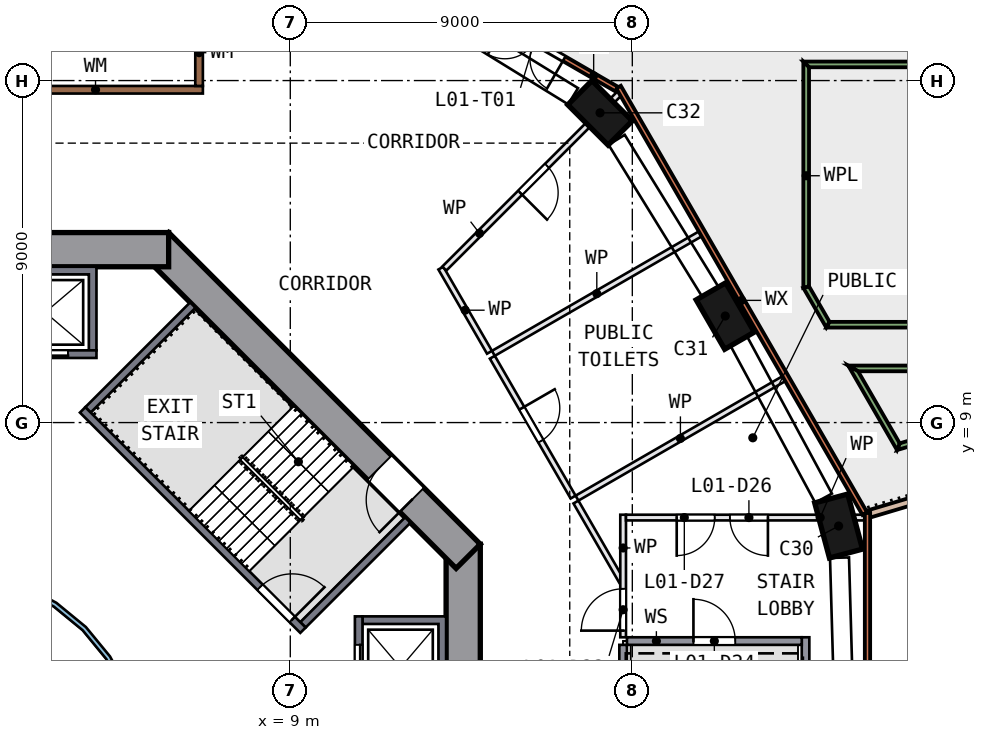
"""IFC4 building model, lengths in metres.
Left out: names, types, materials, properties, quantities, classifications, styles, units other than length and angle.
Written with IfcOpenShell. Run it as: python <this file> out.ifc"""

import sys

from ifc_helpers import new_model, si_unit, direction, frame, frame_2d, origin, origin_2d, place, context, subcontext, project, spatial, polyline, rectangle, outline, extrude, element, fill, save


model = new_model("IFC4")
c1 = context("Model", 3, precision=1e-05, world=origin(), true_north=direction((0.0, 1.0)))
c2 = subcontext(c1, "Body", "Model", "MODEL_VIEW")
j1 = project(units=[si_unit("LENGTHUNIT", "METRE"), si_unit("PLANEANGLEUNIT", "RADIAN")], contexts=[c1])
p1 = place(None, origin())
s1 = spatial("IfcSite", under=j1, at=p1, CompositionType="ELEMENT")
p2 = place(p1, origin())
s2 = spatial("IfcBuilding", under=s1, at=p2, CompositionType="ELEMENT")
p3 = place(p2, frame((0.0, 0.0, 8.0)))
s3 = spatial("IfcBuildingStorey", under=s2, at=p3, CompositionType="ELEMENT", Elevation=8.0)
for number, where, z_axis, x_axis in (
    (1, (23.428, 6.278, 0.0), (0.0, 0.0, 1.0), (0.259, -0.966, 0.0)),
    (2, (20.445, 11.804, 0.0), (0.0, 0.0, 1.0), (-0.5, 0.866, 0.0)),
    (3, (17.151, 17.151, 0.0), (0.0, 0.0, 1.0), (0.707, -0.707, 0.0)),
):
    element("IfcColumn", number, at=place(p3, frame(where, z_axis=z_axis, x_axis=x_axis)), inside=s3, PredefinedType="COLUMN", context=c2, shape_type="SweptSolid", body=[
        extrude(rectangle(XDim=1.5, YDim=0.9, at=origin_2d()), origin(), (0.0, 0.0, 1.0), 5.55),
    ])
p4 = place(p3, frame((13.55, -5.799, 0.0), z_axis=(0.0, 0.0, 1.0), x_axis=(0.0, 1.0, 0.0)))
e4 = element("IfcWall", 4, at=p4, inside=s3, PredefinedType="SHEAR", context=c2, shape_type="SweptSolid", body=[
    extrude(rectangle(XDim=11.598, YDim=0.9, at=frame_2d((5.799, 0.0))), origin(), (0.0, 0.0, 1.0), 6.0),
])
p5 = place(p4, frame((4.899, 0.0, 0.0)))
e5 = element("IfcOpeningElement", 5, at=p5, cuts=e4, PredefinedType="OPENING", context=c2, shape_type="SweptSolid", body=[
    extrude(rectangle(XDim=1.8, YDim=2.1, at=frame_2d((0.9, 1.05))), frame((0.0, 0.46, 0.0), z_axis=(0.0, -1.0, 0.0), x_axis=(1.0, 0.0, 0.0)), (0.0, 0.0, 1.0), 0.92),
])
p6 = place(p3, frame((13.682, 5.481, 0.0), z_axis=(0.0, 0.0, 1.0), x_axis=(-0.707106781, 0.707106781, 0.0)))
e6 = element("IfcWall", 6, at=p6, inside=s3, PredefinedType="SHEAR", context=c2, shape_type="SweptSolid", body=[
    extrude(rectangle(XDim=11.598, YDim=0.9, at=frame_2d((5.799, 0.0))), origin(), (0.0, 0.0, 1.0), 6.0),
])
p7 = place(p6, frame((2.099, 0.0, 0.0)))
e7 = element("IfcOpeningElement", 7, at=p7, cuts=e6, PredefinedType="OPENING", context=c2, shape_type="SweptSolid", body=[
    extrude(rectangle(XDim=1.2, YDim=2.1, at=frame_2d((0.6, 1.05))), frame((0.0, 0.46, 0.0), z_axis=(0.0, -1.0, 0.0), x_axis=(1.0, 0.0, 0.0)), (0.0, 0.0, 1.0), 0.92),
])
p8 = place(p3, frame((5.799, 13.55, 0.0), z_axis=(0.0, 0.0, 1.0), x_axis=(-1.0, 0.0, 0.0)))
e8 = element("IfcWall", 8, at=p8, inside=s3, PredefinedType="SHEAR", context=c2, shape_type="SweptSolid", body=[
    extrude(rectangle(XDim=11.598, YDim=0.9, at=frame_2d((5.799, 0.0))), origin(), (0.0, 0.0, 1.0), 6.0),
])
p9 = place(p8, frame((4.899, 0.0, 0.0)))
e9 = element("IfcOpeningElement", 9, at=p9, cuts=e8, PredefinedType="OPENING", context=c2, shape_type="SweptSolid", body=[
    extrude(rectangle(XDim=1.8, YDim=2.1, at=frame_2d((0.9, 1.05))), frame((0.0, 0.46, 0.0), z_axis=(0.0, -1.0, 0.0), x_axis=(1.0, 0.0, 0.0)), (0.0, 0.0, 1.0), 0.92),
])
p10 = place(p3, frame((24.188, -6.621, 0.0), z_axis=(0.0, 0.0, 1.0), x_axis=(0.0, 1.0, 0.0)))
e10 = element("IfcWall", 10, at=p10, inside=s3, PredefinedType="SOLIDWALL", context=c2, shape_type="SweptSolid", body=[
    extrude(rectangle(XDim=13.242, YDim=0.14, at=frame_2d((6.621, 0.0))), origin(), (0.0, 0.0, 1.0), 5.55),
])
p11 = place(p3, frame((24.118, 6.603, 0.0), z_axis=(0.0, 0.0, 1.0), x_axis=(-0.499997984, 0.866026568, 0.0)))
e11 = element("IfcWall", 11, at=p11, inside=s3, PredefinedType="SOLIDWALL", context=c2, shape_type="SweptSolid", body=[
    extrude(rectangle(XDim=12.962, YDim=0.14, at=frame_2d((6.481, 0.0))), origin(), (0.0, 0.0, 1.0), 5.55),
])
p12 = place(p3, frame((17.586, 17.777, 0.0), z_axis=(0.0, 0.0, 1.0), x_axis=(-0.866020975, 0.500007671, 0.0)))
e12 = element("IfcWall", 12, at=p12, inside=s3, PredefinedType="SOLIDWALL", context=c2, shape_type="SweptSolid", body=[
    extrude(rectangle(XDim=4.446, YDim=0.14, at=frame_2d((2.223, 0.0))), origin(), (0.0, 0.0, 1.0), 5.55),
])
p13 = place(p12, frame((1.593, 0.0, 0.0)))
e13 = element("IfcOpeningElement", 13, at=p13, cuts=e12, PredefinedType="OPENING", context=c2, shape_type="SweptSolid", body=[
    extrude(rectangle(XDim=1.8, YDim=2.4, at=frame_2d((0.9, 1.2))), frame((0.0, 0.08, 0.0), z_axis=(0.0, -1.0, 0.0), x_axis=(1.0, 0.0, 0.0)), (0.0, 0.0, 1.0), 0.16),
])
p14 = place(p3, origin())
e14 = element("IfcWall", 14, at=p14, inside=s3, PredefinedType="SOLIDWALL", context=c2, shape_type="SweptSolid", body=[
    extrude(outline(polyline([(24.201, 6.692), (24.258, 6.5), (36.0, 10.0), (35.8, 10.149), (24.201, 6.692)])), origin(), (0.0, 0.0, 1.0), 0.45),
])
p15 = place(p3, origin())
e15 = element("IfcWall", 15, at=p15, inside=s3, PredefinedType="SOLIDWALL", context=c2, shape_type="SweptSolid", body=[
    extrude(outline(polyline([(24.965, 8.276), (32.427, 10.5), (31.398, 10.35), (25.036, 8.454), (24.965, 8.276)])), origin(), (0.0, 0.0, 1.0), 0.6),
])
p16 = place(p3, origin())
e16 = element("IfcWall", 16, at=p16, inside=s3, PredefinedType="SOLIDWALL", context=c2, shape_type="SweptSolid", body=[
    extrude(outline(polyline([(32.427, 10.5), (23.681, 10.5), (23.941, 10.35), (31.398, 10.35), (32.427, 10.5)])), origin(), (0.0, 0.0, 1.0), 0.6),
])
p17 = place(p3, origin())
e17 = element("IfcWall", 17, at=p17, inside=s3, PredefinedType="SOLIDWALL", context=c2, shape_type="SweptSolid", body=[
    extrude(outline(polyline([(23.681, 10.5), (24.965, 8.276), (25.036, 8.454), (23.941, 10.35), (23.681, 10.5)])), origin(), (0.0, 0.0, 1.0), 0.6),
])
p18 = place(p3, origin())
e18 = element("IfcWall", 18, at=p18, inside=s3, PredefinedType="SOLIDWALL", context=c2, shape_type="SweptSolid", body=[
    extrude(outline(polyline([(22.5, 12.545), (23.104, 11.5), (23.19, 11.65), (22.65, 12.586), (22.5, 12.545)])), origin(), (0.0, 0.0, 1.0), 0.6),
])
p19 = place(p3, origin())
e19 = element("IfcWall", 19, at=p19, inside=s3, PredefinedType="SOLIDWALL", context=c2, shape_type="SweptSolid", body=[
    extrude(outline(polyline([(23.104, 11.5), (32.5, 11.5), (32.35, 11.65), (23.19, 11.65), (23.104, 11.5)])), origin(), (0.0, 0.0, 1.0), 0.6),
])
p20 = place(p3, origin())
e20 = element("IfcWall", 20, at=p20, inside=s3, PredefinedType="SOLIDWALL", context=c2, shape_type="SweptSolid", body=[
    extrude(outline(polyline([(28.5, 18.5), (22.5, 18.5), (22.65, 18.35), (28.65, 18.35), (28.5, 18.5)])), origin(), (0.0, 0.0, 1.0), 0.6),
])
p21 = place(p3, origin())
e21 = element("IfcWall", 21, at=p21, inside=s3, PredefinedType="SOLIDWALL", context=c2, shape_type="SweptSolid", body=[
    extrude(outline(polyline([(22.5, 18.5), (22.5, 12.545), (22.65, 12.586), (22.65, 18.35), (22.5, 18.5)])), origin(), (0.0, 0.0, 1.0), 0.6),
])
p22 = place(p3, origin())
e22 = element("IfcWall", 22, at=p22, inside=s3, PredefinedType="SOLIDWALL", context=c2, shape_type="SweptSolid", body=[
    extrude(outline(polyline([(13.1, 3.9), (13.1, 1.2), (10.9, 1.2), (10.9, 1.4), (12.9, 1.4), (12.9, 3.7), (10.9, 3.7), (10.9, 3.9), (13.1, 3.9)])), origin(), (0.0, 0.0, 1.0), 5.55),
])
p23 = place(p3, frame((10.8, 1.2, 0.0), z_axis=(0.0, 0.0, 1.0), x_axis=(0.0, 1.0, 0.0)))
e23 = element("IfcWall", 23, at=p23, inside=s3, PredefinedType="SOLIDWALL", context=c2, shape_type="SweptSolid", body=[
    extrude(rectangle(XDim=2.7, YDim=0.2, at=frame_2d((1.35, 0.0))), origin(), (0.0, 0.0, 1.0), 5.55),
])
p24 = place(p23, frame((0.75, 0.0, 0.0)))
e24 = element("IfcOpeningElement", 24, at=p24, cuts=e23, PredefinedType="OPENING", context=c2, shape_type="SweptSolid", body=[
    extrude(rectangle(XDim=1.2, YDim=2.1, at=frame_2d((0.6, 1.05))), frame((0.0, 0.11, 0.0), z_axis=(0.0, -1.0, 0.0), x_axis=(1.0, 0.0, 0.0)), (0.0, 0.0, 1.0), 0.22),
])
p25 = place(p3, origin())
e25 = element("IfcWall", 25, at=p25, inside=s3, PredefinedType="SOLIDWALL", context=c2, shape_type="SweptSolid", body=[
    extrude(outline(polyline([(3.9, 13.1), (3.9, 10.9), (3.7, 10.9), (3.7, 12.9), (1.4, 12.9), (1.4, 10.9), (1.2, 10.9), (1.2, 13.1), (3.9, 13.1)])), origin(), (0.0, 0.0, 1.0), 5.55),
])
p26 = place(p3, frame((1.2, 10.8, 0.0), z_axis=(0.0, 0.0, 1.0), x_axis=(1.0, 0.0, 0.0)))
e26 = element("IfcWall", 26, at=p26, inside=s3, PredefinedType="SOLIDWALL", context=c2, shape_type="SweptSolid", body=[
    extrude(rectangle(XDim=2.7, YDim=0.2, at=frame_2d((1.35, 0.0))), origin(), (0.0, 0.0, 1.0), 5.55),
])
p27 = place(p26, frame((0.75, 0.0, 0.0)))
e27 = element("IfcOpeningElement", 27, at=p27, cuts=e26, PredefinedType="OPENING", context=c2, shape_type="SweptSolid", body=[
    extrude(rectangle(XDim=1.2, YDim=2.1, at=frame_2d((0.6, 1.05))), frame((0.0, 0.11, 0.0), z_axis=(0.0, -1.0, 0.0), x_axis=(1.0, 0.0, 0.0)), (0.0, 0.0, 1.0), 0.22),
])
p28 = place(p3, frame((3.535, 9.334, 0.0), z_axis=(0.0, 0.0, 1.0), x_axis=(0.707106781, -0.707106781, 0.0)))
e28 = element("IfcWall", 28, at=p28, inside=s3, PredefinedType="SOLIDWALL", context=c2, shape_type="SweptSolid", body=[
    extrude(rectangle(XDim=8.2, YDim=0.2, at=frame_2d((4.1, 0.0))), origin(), (0.0, 0.0, 1.0), 5.55),
])
p29 = place(p28, frame((6.6, 0.0, 0.0)))
e29 = element("IfcOpeningElement", 29, at=p29, cuts=e28, PredefinedType="OPENING", context=c2, shape_type="SweptSolid", body=[
    extrude(rectangle(XDim=1.2, YDim=2.1, at=frame_2d((0.6, 1.05))), frame((0.0, 0.11, 0.0), z_axis=(0.0, -1.0, 0.0), x_axis=(1.0, 0.0, 0.0)), (0.0, 0.0, 1.0), 0.22),
])
for number, where, z_axis, x_axis in (
    (30, (9.334, 3.677, 0.0), (0.0, 0.0, 1.0), (0.707, 0.707, 0.0)),
    (31, (3.677, 9.334, 0.0), (0.0, 0.0, 1.0), (0.707, 0.707, 0.0)),
):
    element("IfcWall", number, at=place(p3, frame(where, z_axis=z_axis, x_axis=x_axis)), inside=s3, PredefinedType="SOLIDWALL", context=c2, shape_type="SweptSolid", body=[
        extrude(rectangle(XDim=3.9, YDim=0.2, at=frame_2d((1.95, 0.0))), origin(), (0.0, 0.0, 1.0), 5.55),
    ])
p30 = place(p3, origin())
e32 = element("IfcWall", 32, at=p30, inside=s3, PredefinedType="SOLIDWALL", context=c2, shape_type="SweptSolid", body=[
    extrude(outline(polyline([(5.021, -0.999), (4.73, -1.959), (4.257, -2.844), (3.62, -3.62), (2.844, -4.257), (1.959, -4.73), (0.999, -5.021), (0.0, -5.12), (-0.999, -5.021), (-1.959, -4.73), (-2.844, -4.257), (-3.62, -3.62), (-4.257, -2.844), (-4.73, -1.959), (-5.021, -0.999), (-5.12, 0.0), (-5.021, 0.999), (-4.73, 1.959), (-4.257, 2.844), (-3.62, 3.62), (-2.844, 4.257), (-1.959, 4.73), (-0.999, 5.021), (0.0, 5.12), (0.999, 5.021), (1.959, 4.73), (2.844, 4.257), (3.62, 3.62), (4.257, 2.844), (4.73, 1.959), (5.021, 0.999), (5.12, 0.0), (5.021, -0.999)]), holes=[polyline([(4.904, 0.976), (4.619, 1.913), (4.157, 2.778), (3.535, 3.535), (2.778, 4.157), (1.913, 4.619), (0.976, 4.904), (0.0, 5.0), (-0.976, 4.904), (-1.913, 4.619), (-2.778, 4.157), (-3.535, 3.535), (-4.157, 2.778), (-4.619, 1.913), (-4.904, 0.976), (-5.0, 0.0), (-4.904, -0.976), (-4.619, -1.913), (-4.157, -2.778), (-3.535, -3.535), (-2.778, -4.157), (-1.913, -4.619), (-0.976, -4.904), (0.0, -5.0), (0.976, -4.904), (1.913, -4.619), (2.778, -4.157), (3.535, -3.535), (4.157, -2.778), (4.619, -1.913), (4.904, -0.976), (5.0, 0.0), (4.904, 0.976)])]), origin(), (0.0, 0.0, 1.0), 5.55),
])
p31 = place(p3, frame((6.7, 17.758, 0.0), z_axis=(0.0, 0.0, 1.0), x_axis=(-1.0, 0.0, 0.0)))
e33 = element("IfcWall", 33, at=p31, inside=s3, PredefinedType="SOLIDWALL", context=c2, shape_type="SweptSolid", body=[
    extrude(rectangle(XDim=13.2, YDim=0.2, at=frame_2d((6.6, 0.0))), origin(), (0.0, 0.0, 1.0), 5.55),
])
p32 = place(p31, frame((5.85, 0.0, 0.0)))
e34 = element("IfcOpeningElement", 34, at=p32, cuts=e33, PredefinedType="OPENING", context=c2, shape_type="SweptSolid", body=[
    extrude(rectangle(XDim=1.8, YDim=2.1, at=frame_2d((0.9, 1.05))), frame((0.0, 0.11, 0.0), z_axis=(0.0, -1.0, 0.0), x_axis=(1.0, 0.0, 0.0)), (0.0, 0.0, 1.0), 0.22),
])
p33 = place(p3, frame((6.6, 23.415, 0.0), z_axis=(0.0, 0.0, 1.0), x_axis=(0.0, -1.0, 0.0)))
e35 = element("IfcWall", 35, at=p33, inside=s3, PredefinedType="SOLIDWALL", context=c2, shape_type="SweptSolid", body=[
    extrude(rectangle(XDim=5.557, YDim=0.2, at=frame_2d((2.778, 0.0))), origin(), (0.0, 0.0, 1.0), 5.55),
])
p34 = place(p33, frame((1.807, 0.0, 0.0)))
e36 = element("IfcOpeningElement", 36, at=p34, cuts=e35, PredefinedType="OPENING", context=c2, shape_type="SweptSolid", body=[
    extrude(rectangle(XDim=1.8, YDim=2.1, at=frame_2d((0.9, 1.05))), frame((0.0, 0.11, 0.0), z_axis=(0.0, -1.0, 0.0), x_axis=(1.0, 0.0, 0.0)), (0.0, 0.0, 1.0), 0.22),
])
p35 = place(p3, frame((12.962, 13.065, 0.0), z_axis=(0.0, 0.0, 1.0), x_axis=(0.499997778, -0.866026686, 0.0)))
e37 = element("IfcWall", 37, at=p35, inside=s3, PredefinedType="PARTITIONING", context=c2, shape_type="SweptSolid", body=[
    extrude(rectangle(XDim=2.559, YDim=0.15, at=frame_2d((1.279, 0.0))), origin(), (0.0, 0.0, 1.0), 5.55),
])
p36 = place(p3, frame((14.317, 10.719, 0.0), z_axis=(0.0, 0.0, 1.0), x_axis=(0.500037366, -0.866003829, 0.0)))
e38 = element("IfcWall", 38, at=p36, inside=s3, PredefinedType="PARTITIONING", context=c2, shape_type="SweptSolid", body=[
    extrude(rectangle(XDim=4.25, YDim=0.15, at=frame_2d((2.125, 0.0))), origin(), (0.0, 0.0, 1.0), 5.55),
])
p37 = place(p36, frame((1.55, 0.0, 0.0)))
e39 = element("IfcOpeningElement", 39, at=p37, cuts=e38, PredefinedType="OPENING", context=c2, shape_type="SweptSolid", body=[
    extrude(rectangle(XDim=1.0, YDim=2.1, at=frame_2d((0.5, 1.05))), frame((0.0, 0.085, 0.0), z_axis=(0.0, -1.0, 0.0), x_axis=(1.0, 0.0, 0.0)), (0.0, 0.0, 1.0), 0.17),
])
p38 = place(p3, frame((16.517, 6.909, 0.0), z_axis=(0.0, 0.0, 1.0), x_axis=(0.499933044, -0.866064057, 0.0)))
e40 = element("IfcWall", 40, at=p38, inside=s3, PredefinedType="PARTITIONING", context=c2, shape_type="SweptSolid", body=[
    extrude(rectangle(XDim=2.408, YDim=0.15, at=frame_2d((1.204, 0.0))), origin(), (0.0, 0.0, 1.0), 5.55),
])
p39 = place(p3, frame((17.758, 3.15, 0.0), z_axis=(0.0, 0.0, 1.0), x_axis=(0.0, -1.0, 0.0)))
e41 = element("IfcWall", 41, at=p39, inside=s3, PredefinedType="SOLIDWALL", context=c2, shape_type="SweptSolid", body=[
    extrude(rectangle(XDim=9.3, YDim=0.2, at=frame_2d((4.65, 0.0))), origin(), (0.0, 0.0, 1.0), 5.55),
])
p40 = place(p3, frame((17.758, 3.35, 0.0), z_axis=(0.0, 0.0, 1.0), x_axis=(0.0, 1.0, 0.0)))
e42 = element("IfcWall", 42, at=p40, inside=s3, PredefinedType="PARTITIONING", context=c2, shape_type="SweptSolid", body=[
    extrude(rectangle(XDim=3.225, YDim=0.15, at=frame_2d((1.613, 0.0))), origin(), (0.0, 0.0, 1.0), 5.55),
])
p41 = place(p40, frame((0.175, 0.0, 0.0)))
e43 = element("IfcOpeningElement", 43, at=p41, cuts=e42, PredefinedType="OPENING", context=c2, shape_type="SweptSolid", body=[
    extrude(rectangle(XDim=1.1, YDim=2.1, at=frame_2d((0.55, 1.05))), frame((0.0, 0.085, 0.0), z_axis=(0.0, -1.0, 0.0), x_axis=(1.0, 0.0, 0.0)), (0.0, 0.0, 1.0), 0.17),
])
p42 = place(p3, frame((17.7, 17.7, 0.0), z_axis=(0.0, 0.0, 1.0), x_axis=(-0.707106781, -0.707106781, 0.0)))
e44 = element("IfcWall", 44, at=p42, inside=s3, PredefinedType="PARTITIONING", context=c2, shape_type="SweptSolid", body=[
    extrude(rectangle(XDim=6.572, YDim=0.15, at=frame_2d((3.286, 0.0))), origin(), (0.0, 0.0, 1.0), 5.55),
])
p43 = place(p42, frame((2.75, 0.0, 0.0)))
e45 = element("IfcOpeningElement", 45, at=p43, cuts=e44, PredefinedType="OPENING", context=c2, shape_type="SweptSolid", body=[
    extrude(rectangle(XDim=1.0, YDim=2.1, at=frame_2d((0.5, 1.05))), frame((0.0, 0.085, 0.0), z_axis=(0.0, -1.0, 0.0), x_axis=(1.0, 0.0, 0.0)), (0.0, 0.0, 1.0), 0.17),
])
p44 = place(p3, frame((19.787, 13.964, 0.0), z_axis=(0.0, 0.0, 1.0), x_axis=(-0.866042631, -0.49997016, 0.0)))
e46 = element("IfcWall", 46, at=p44, inside=s3, PredefinedType="PARTITIONING", context=c2, shape_type="SweptSolid", body=[
    extrude(rectangle(XDim=6.285, YDim=0.15, at=frame_2d((3.143, 0.0))), origin(), (0.0, 0.0, 1.0), 5.55),
])
p45 = place(p3, frame((21.987, 10.154, 0.0), z_axis=(0.0, 0.0, 1.0), x_axis=(-0.866032921, -0.49998698, 0.0)))
e47 = element("IfcWall", 47, at=p45, inside=s3, PredefinedType="PARTITIONING", context=c2, shape_type="SweptSolid", body=[
    extrude(rectangle(XDim=6.285, YDim=0.15, at=frame_2d((3.143, 0.0))), origin(), (0.0, 0.0, 1.0), 5.55),
])
p46 = place(p3, frame((22.558, -6.15, 0.0), z_axis=(0.0, 0.0, 1.0), x_axis=(0.0, 1.0, 0.0)))
e48 = element("IfcWall", 48, at=p46, inside=s3, PredefinedType="SOLIDWALL", context=c2, shape_type="SweptSolid", body=[
    extrude(rectangle(XDim=9.5, YDim=0.2, at=frame_2d((4.75, 0.0))), origin(), (0.0, 0.0, 1.0), 5.55),
])
p47 = place(p3, frame((17.858, 3.25, 0.0), z_axis=(0.0, 0.0, 1.0), x_axis=(1.0, 0.0, 0.0)))
e49 = element("IfcWall", 49, at=p47, inside=s3, PredefinedType="SOLIDWALL", context=c2, shape_type="SweptSolid", body=[
    extrude(rectangle(XDim=4.6, YDim=0.2, at=frame_2d((2.3, 0.0))), origin(), (0.0, 0.0, 1.0), 5.55),
])
p48 = place(p47, frame((1.75, 0.0, 0.0)))
e50 = element("IfcOpeningElement", 50, at=p48, cuts=e49, PredefinedType="OPENING", context=c2, shape_type="SweptSolid", body=[
    extrude(rectangle(XDim=1.1, YDim=2.1, at=frame_2d((0.55, 1.05))), frame((0.0, 0.11, 0.0), z_axis=(0.0, -1.0, 0.0), x_axis=(1.0, 0.0, 0.0)), (0.0, 0.0, 1.0), 0.22),
])
p49 = place(p3, frame((24.118, 6.5, 0.0), z_axis=(0.0, 0.0, 1.0), x_axis=(-1.0, 0.0, 0.0)))
e51 = element("IfcWall", 51, at=p49, inside=s3, PredefinedType="PARTITIONING", context=c2, shape_type="SweptSolid", body=[
    extrude(rectangle(XDim=6.285, YDim=0.15, at=frame_2d((3.143, 0.0))), origin(), (0.0, 0.0, 1.0), 5.55),
])
p50 = place(p49, frame((2.55, 0.0, 0.0)))
e52 = element("IfcOpeningElement", 52, at=p50, cuts=e51, PredefinedType="OPENING", context=c2, shape_type="SweptSolid", body=[
    extrude(rectangle(XDim=1.0, YDim=2.1, at=frame_2d((0.5, 1.05))), frame((0.0, 0.085, 0.0), z_axis=(0.0, -1.0, 0.0), x_axis=(1.0, 0.0, 0.0)), (0.0, 0.0, 1.0), 0.17),
])
p51 = place(p49, frame((3.95, 0.0, 0.0)))
e53 = element("IfcOpeningElement", 53, at=p51, cuts=e51, PredefinedType="OPENING", context=c2, shape_type="SweptSolid", body=[
    extrude(rectangle(XDim=1.0, YDim=2.1, at=frame_2d((0.5, 1.05))), frame((0.0, 0.085, 0.0), z_axis=(0.0, -1.0, 0.0), x_axis=(1.0, 0.0, 0.0)), (0.0, 0.0, 1.0), 0.17),
])
p52 = place(p13, origin())
e54 = element("IfcDoor", 54, at=p52, inside=s3, OperationType="DOUBLE_DOOR_SINGLE_SWING", PredefinedType="DOOR", context=c2, shape_type="SweptSolid", body=[
    extrude(rectangle(XDim=1.8, YDim=2.4, at=frame_2d((0.9, 1.2))), frame((0.0, 0.025, 0.0), z_axis=(0.0, -1.0, 0.0), x_axis=(1.0, 0.0, 0.0)), (0.0, 0.0, 1.0), 0.05),
])
fill(e13, e54)
p53 = place(p24, origin())
e55 = element("IfcDoor", 55, at=p53, inside=s3, OperationType="DOUBLE_DOOR_SLIDING", PredefinedType="DOOR", context=c2, shape_type="SweptSolid", body=[
    extrude(rectangle(XDim=1.2, YDim=2.1, at=frame_2d((0.6, 1.05))), frame((0.0, 0.025, 0.0), z_axis=(0.0, -1.0, 0.0), x_axis=(1.0, 0.0, 0.0)), (0.0, 0.0, 1.0), 0.05),
])
fill(e24, e55)
p54 = place(p27, origin())
e56 = element("IfcDoor", 56, at=p54, inside=s3, OperationType="DOUBLE_DOOR_SLIDING", PredefinedType="DOOR", context=c2, shape_type="SweptSolid", body=[
    extrude(rectangle(XDim=1.2, YDim=2.1, at=frame_2d((0.6, 1.05))), frame((0.0, 0.025, 0.0), z_axis=(0.0, -1.0, 0.0), x_axis=(1.0, 0.0, 0.0)), (0.0, 0.0, 1.0), 0.05),
])
fill(e27, e56)
p55 = place(p29, origin())
e57 = element("IfcDoor", 57, at=p55, inside=s3, OperationType="SINGLE_SWING_RIGHT", PredefinedType="DOOR", context=c2, shape_type="SweptSolid", body=[
    extrude(rectangle(XDim=1.2, YDim=2.1, at=frame_2d((0.6, 1.05))), frame((0.0, 0.025, 0.0), z_axis=(0.0, -1.0, 0.0), x_axis=(1.0, 0.0, 0.0)), (0.0, 0.0, 1.0), 0.05),
])
fill(e29, e57)
p56 = place(p7, origin())
e58 = element("IfcDoor", 58, at=p56, inside=s3, OperationType="SINGLE_SWING_LEFT", PredefinedType="DOOR", context=c2, shape_type="SweptSolid", body=[
    extrude(rectangle(XDim=1.2, YDim=2.1, at=frame_2d((0.6, 1.05))), frame((0.0, 0.025, 0.0), z_axis=(0.0, -1.0, 0.0), x_axis=(1.0, 0.0, 0.0)), (0.0, 0.0, 1.0), 0.05),
])
fill(e7, e58)
p57 = place(p37, origin())
e59 = element("IfcDoor", 59, at=p57, inside=s3, OperationType="SINGLE_SWING_LEFT", PredefinedType="DOOR", context=c2, shape_type="SweptSolid", body=[
    extrude(rectangle(XDim=1.0, YDim=2.1, at=frame_2d((0.5, 1.05))), frame((0.0, 0.025, 0.0), z_axis=(0.0, -1.0, 0.0), x_axis=(1.0, 0.0, 0.0)), (0.0, 0.0, 1.0), 0.05),
])
fill(e39, e59)
p58 = place(p41, origin())
e60 = element("IfcDoor", 60, at=p58, inside=s3, OperationType="SINGLE_SWING_LEFT", PredefinedType="DOOR", context=c2, shape_type="SweptSolid", body=[
    extrude(rectangle(XDim=1.1, YDim=2.1, at=frame_2d((0.55, 1.05))), frame((0.0, 0.025, 0.0), z_axis=(0.0, -1.0, 0.0), x_axis=(1.0, 0.0, 0.0)), (0.0, 0.0, 1.0), 0.05),
])
fill(e43, e60)
p59 = place(p43, origin())
e61 = element("IfcDoor", 61, at=p59, inside=s3, OperationType="SINGLE_SWING_RIGHT", PredefinedType="DOOR", context=c2, shape_type="SweptSolid", body=[
    extrude(rectangle(XDim=1.0, YDim=2.1, at=frame_2d((0.5, 1.05))), frame((0.0, 0.025, 0.0), z_axis=(0.0, -1.0, 0.0), x_axis=(1.0, 0.0, 0.0)), (0.0, 0.0, 1.0), 0.05),
])
fill(e45, e61)
p60 = place(p48, origin())
e62 = element("IfcDoor", 62, at=p60, inside=s3, OperationType="SINGLE_SWING_LEFT", PredefinedType="DOOR", context=c2, shape_type="SweptSolid", body=[
    extrude(rectangle(XDim=1.1, YDim=2.1, at=frame_2d((0.55, 1.05))), frame((0.0, 0.025, 0.0), z_axis=(0.0, -1.0, 0.0), x_axis=(1.0, 0.0, 0.0)), (0.0, 0.0, 1.0), 0.05),
])
fill(e50, e62)
p61 = place(p50, origin())
e63 = element("IfcDoor", 63, at=p61, inside=s3, OperationType="SINGLE_SWING_LEFT", PredefinedType="DOOR", context=c2, shape_type="SweptSolid", body=[
    extrude(rectangle(XDim=1.0, YDim=2.1, at=frame_2d((0.5, 1.05))), frame((0.0, 0.025, 0.0), z_axis=(0.0, -1.0, 0.0), x_axis=(1.0, 0.0, 0.0)), (0.0, 0.0, 1.0), 0.05),
])
fill(e52, e63)
p62 = place(p51, origin())
e64 = element("IfcDoor", 64, at=p62, inside=s3, OperationType="SINGLE_SWING_RIGHT", PredefinedType="DOOR", context=c2, shape_type="SweptSolid", body=[
    extrude(rectangle(XDim=1.0, YDim=2.1, at=frame_2d((0.5, 1.05))), frame((0.0, 0.025, 0.0), z_axis=(0.0, -1.0, 0.0), x_axis=(1.0, 0.0, 0.0)), (0.0, 0.0, 1.0), 0.05),
])
fill(e53, e64)
save(model, sys.argv[1])
